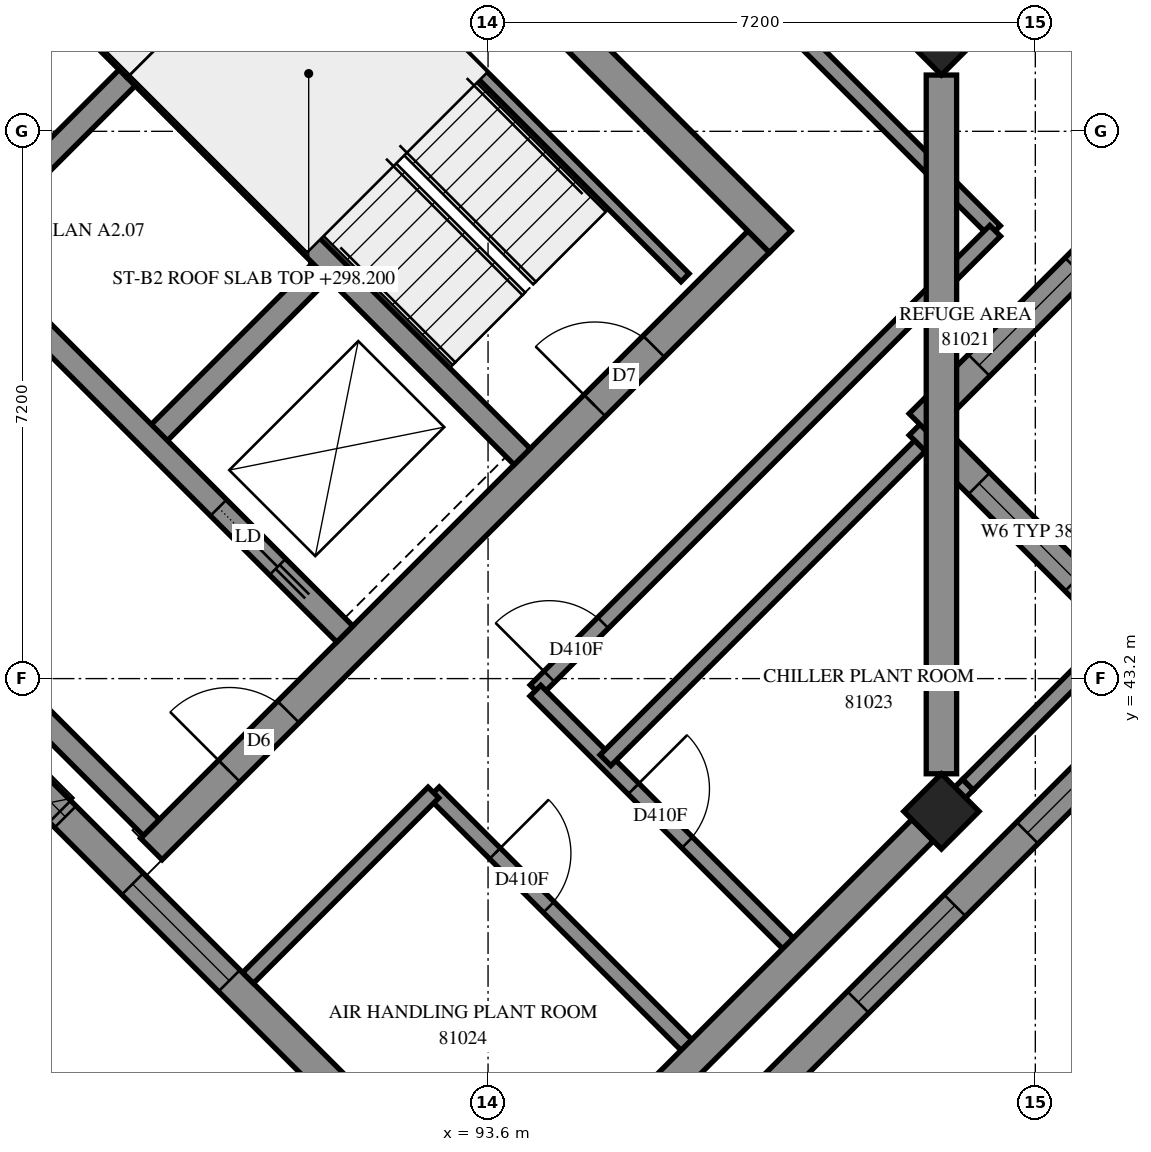
"""IFC4 building model, lengths in metres.
Left out: names, types, materials, properties, quantities, classifications, styles, units other than length and angle.
Written with IfcOpenShell. Run it as: python <this file> out.ifc"""

import sys

from ifc_helpers import new_model, si_unit, direction, frame, frame_2d, origin, origin_2d, place, context, subcontext, project, spatial, polyline, rectangle, outline, extrude, element, fill, save


model = new_model("IFC4")
c1 = context("Model", 3, precision=1e-05, world=origin(), true_north=direction((0.0, 1.0)))
c2 = subcontext(c1, "Body", "Model", "MODEL_VIEW")
j1 = project(units=[si_unit("LENGTHUNIT", "METRE"), si_unit("PLANEANGLEUNIT", "RADIAN")], contexts=[c1])
p1 = place(None, origin())
s1 = spatial("IfcSite", under=j1, at=p1, CompositionType="ELEMENT")
p2 = place(p1, origin())
s2 = spatial("IfcBuilding", under=s1, at=p2, CompositionType="ELEMENT")
p3 = place(p2, frame((0.0, 0.0, 298.2)))
s3 = spatial("IfcBuildingStorey", under=s2, at=p3, CompositionType="ELEMENT", Elevation=298.2)
for number, where, z_axis, x_axis in (
    (1, (99.565, 51.635, 0.0), (0.0, 0.0, 1.0), (0.707, -0.707, 0.0)),
    (2, (99.565, 41.453, 0.0), (0.0, 0.0, 1.0), (0.707, -0.707, 0.0)),
):
    element("IfcColumn", number, at=place(p3, frame(where, z_axis=z_axis, x_axis=x_axis)), inside=s3, PredefinedType="COLUMN", context=c2, shape_type="SweptSolid", body=[
        extrude(rectangle(XDim=0.7, YDim=0.7, at=origin_2d()), origin(), (0.0, 0.0, 1.0), 3.5),
    ])
p4 = place(p3, frame((86.695, 59.696, -0.3), z_axis=(0.0, 0.0, 1.0), x_axis=(0.7071100706, -0.7071034917, 0.0)))
e3 = element("IfcWall", 3, at=p4, inside=s3, PredefinedType="SHEAR", context=c2, shape_type="SweptSolid", body=[
    extrude(outline(polyline([(0.0, 0.0), (15.2, 0.0), (15.2, 3.1), (0.0, 3.1), (0.0, 0.0)])), frame((0.0, 0.2, 0.0), z_axis=(0.0, -1.0, 0.0), x_axis=(1.0, 0.0, 0.0)), (0.0, 0.0, 1.0), 0.4),
])
p5 = place(p4, frame((10.4, 0.0, 0.3)))
e4 = element("IfcOpeningElement", 4, at=p5, cuts=e3, PredefinedType="OPENING", context=c2, shape_type="SweptSolid", body=[
    extrude(rectangle(XDim=0.8, YDim=2.1, at=frame_2d((0.4, 1.05))), frame((0.0, 0.21, 0.0), z_axis=(0.0, -1.0, 0.0), x_axis=(1.0, 0.0, 0.0)), (0.0, 0.0, 1.0), 0.42),
])
p6 = place(p3, frame((89.17, 40.958, -0.3), z_axis=(0.0, 0.0, 1.0), x_axis=(0.7071067812, 0.7071067812, 0.0)))
e5 = element("IfcWall", 5, at=p6, inside=s3, PredefinedType="SHEAR", context=c2, shape_type="SweptSolid", body=[
    extrude(outline(polyline([(0.0, 0.0), (11.3, 0.0), (11.3, 3.1), (0.0, 3.1), (0.0, 0.0)])), frame((0.0, 0.2, 0.0), z_axis=(0.0, -1.0, 0.0), x_axis=(1.0, 0.0, 0.0)), (0.0, 0.0, 1.0), 0.4),
])
p7 = place(p6, frame((1.45, 0.0, 0.3)))
e6 = element("IfcOpeningElement", 6, at=p7, cuts=e5, PredefinedType="OPENING", context=c2, shape_type="SweptSolid", body=[
    extrude(rectangle(XDim=1.1, YDim=2.1, at=frame_2d((0.55, 1.05))), frame((0.0, 0.21, 0.0), z_axis=(0.0, -1.0, 0.0), x_axis=(1.0, 0.0, 0.0)), (0.0, 0.0, 1.0), 0.42),
])
p8 = place(p6, frame((8.25, 0.0, 0.3)))
e7 = element("IfcOpeningElement", 7, at=p8, cuts=e5, PredefinedType="OPENING", context=c2, shape_type="SweptSolid", body=[
    extrude(rectangle(XDim=1.1, YDim=2.1, at=frame_2d((0.55, 1.05))), frame((0.0, 0.21, 0.0), z_axis=(0.0, -1.0, 0.0), x_axis=(1.0, 0.0, 0.0)), (0.0, 0.0, 1.0), 0.42),
])
for number, where, z_axis, x_axis in (
    (8, (86.625, 48.878, 0.0), (0.0, 0.0, 1.0), (0.707, 0.707, 0.0)),
    (9, (89.17, 46.332, 0.0), (0.0, 0.0, 1.0), (0.707, 0.707, 0.0)),
):
    element("IfcWall", number, at=place(p3, frame(where, z_axis=z_axis, x_axis=x_axis)), inside=s3, PredefinedType="SOLIDWALL", context=c2, shape_type="SweptSolid", body=[
        extrude(outline(polyline([(0.0, 0.0), (3.3, 0.0), (3.3, 3.5), (0.0, 3.5), (0.0, 0.0)])), frame((0.0, 0.15, 0.0), z_axis=(0.0, -1.0, 0.0), x_axis=(1.0, 0.0, 0.0)), (0.0, 0.0, 1.0), 0.3),
    ])
p9 = place(p3, frame((78.988, 51.423, 0.0), z_axis=(0.0, 0.0, 1.0), x_axis=(0.7071067812, -0.7071067812, 0.0)))
e10 = element("IfcWall", 10, at=p9, inside=s3, PredefinedType="SOLIDWALL", context=c2, shape_type="SweptSolid", body=[
    extrude(outline(polyline([(0.0, 0.0), (14.4, 0.0), (14.4, 3.5), (0.0, 3.5), (0.0, 0.0)])), frame((0.0, 0.15, 0.0), z_axis=(0.0, -1.0, 0.0), x_axis=(1.0, 0.0, 0.0)), (0.0, 0.0, 1.0), 0.3),
])
p10 = place(p3, frame((81.534, 53.969, 0.0), z_axis=(0.0, 0.0, 1.0), x_axis=(0.707103309, -0.7071102534, 0.0)))
e11 = element("IfcWall", 11, at=p10, inside=s3, PredefinedType="SOLIDWALL", context=c2, shape_type="SweptSolid", body=[
    extrude(outline(polyline([(0.0, 0.0), (14.4, 0.0), (14.4, 3.5), (0.0, 3.5), (0.0, 0.0)])), frame((0.0, 0.15, 0.0), z_axis=(0.0, -1.0, 0.0), x_axis=(1.0, 0.0, 0.0)), (0.0, 0.0, 1.0), 0.3),
])
p11 = place(p10, frame((12.05, 0.0, 0.0)))
e12 = element("IfcOpeningElement", 12, at=p11, cuts=e11, PredefinedType="OPENING", context=c2, shape_type="SweptSolid", body=[
    extrude(rectangle(XDim=1.1, YDim=2.1, at=frame_2d((0.55, 1.05))), frame((0.0, 0.16, 0.0), z_axis=(0.0, -1.0, 0.0), x_axis=(1.0, 0.0, 0.0)), (0.0, 0.0, 1.0), 0.32),
])
for number, where, z_axis, x_axis in (
    (13, (83.867, 56.302, 0.0), (0.0, 0.0, 1.0), (0.707, -0.707, 0.0)),
    (14, (88.958, 51.211, 0.0), (0.0, 0.0, 1.0), (0.707, -0.707, 0.0)),
):
    element("IfcWall", number, at=place(p3, frame(where, z_axis=z_axis, x_axis=x_axis)), inside=s3, PredefinedType="SOLIDWALL", context=c2, shape_type="SweptSolid", body=[
        extrude(outline(polyline([(0.0, 0.0), (7.2, 0.0), (7.2, 3.5), (0.0, 3.5), (0.0, 0.0)])), frame((0.0, 0.15, 0.0), z_axis=(0.0, -1.0, 0.0), x_axis=(1.0, 0.0, 0.0)), (0.0, 0.0, 1.0), 0.3),
    ])
p12 = place(p3, frame((88.958, 51.211, 0.0), z_axis=(0.0, 0.0, 1.0), x_axis=(0.7071067812, 0.7071067812, 0.0)))
e15 = element("IfcWall", 15, at=p12, inside=s3, PredefinedType="SOLIDWALL", context=c2, shape_type="SweptSolid", body=[
    extrude(outline(polyline([(0.0, 0.0), (4.2, 0.0), (4.2, 3.5), (0.0, 3.5), (0.0, 0.0)])), frame((0.0, 0.15, 0.0), z_axis=(0.0, -1.0, 0.0), x_axis=(1.0, 0.0, 0.0)), (0.0, 0.0, 1.0), 0.3),
])
p13 = place(p3, frame((102.676, 43.15, 0.0), z_axis=(0.0, 0.0, 1.0), x_axis=(-0.7070963646, 0.7071171977, 0.0)))
e16 = element("IfcWall", 16, at=p13, inside=s3, PredefinedType="SOLIDWALL", context=c2, shape_type="SweptSolid", body=[
    extrude(outline(polyline([(-0.2, -0.2), (4.6, -0.2), (5.0, 0.2), (0.2, 0.2), (-0.2, -0.2)])), origin(), (0.0, 0.0, 1.0), 3.5),
])
p14 = place(p13, frame((1.9, 0.0, 0.7)))
e17 = element("IfcOpeningElement", 17, at=p14, cuts=e16, PredefinedType="OPENING", context=c2, shape_type="SweptSolid", body=[
    extrude(rectangle(XDim=1.8, YDim=2.2, at=frame_2d((0.9, 1.1))), frame((0.0, 0.21, 0.0), z_axis=(0.0, -1.0, 0.0), x_axis=(1.0, 0.0, 0.0)), (0.0, 0.0, 1.0), 0.42),
])
p15 = place(p3, frame((99.282, 46.544, 0.0), z_axis=(0.0, 0.0, 1.0), x_axis=(0.7071067812, 0.7071067812, 0.0)))
e18 = element("IfcWall", 18, at=p15, inside=s3, PredefinedType="SOLIDWALL", context=c2, shape_type="SweptSolid", body=[
    extrude(outline(polyline([(0.2, -0.2), (6.23, -0.2), (5.657, 0.2), (-0.2, 0.2), (0.2, -0.2)])), origin(), (0.0, 0.0, 1.0), 3.5),
])
p16 = place(p15, frame((1.1, 0.0, 0.7)))
e19 = element("IfcOpeningElement", 19, at=p16, cuts=e18, PredefinedType="OPENING", context=c2, shape_type="SweptSolid", body=[
    extrude(rectangle(XDim=1.8, YDim=2.2, at=frame_2d((0.9, 1.1))), frame((0.0, 0.21, 0.0), z_axis=(0.0, -1.0, 0.0), x_axis=(1.0, 0.0, 0.0)), (0.0, 0.0, 1.0), 0.42),
])
p17 = place(p3, frame((103.484, 50.747, 0.0), z_axis=(0.0, 0.0, 1.0), x_axis=(-0.9078558767, 0.4192823716, 0.0)))
e20 = element("IfcWall", 20, at=p17, inside=s3, PredefinedType="SOLIDWALL", context=c2, shape_type="SweptSolid", body=[
    extrude(outline(polyline([(-0.287, -0.2), (3.273, -0.2), (3.345, 0.2), (0.287, 0.2), (-0.287, -0.2)])), origin(), (0.0, 0.0, 1.0), 3.5),
])
p18 = place(p17, frame((0.898, 0.0, 0.7)))
e21 = element("IfcOpeningElement", 21, at=p18, cuts=e20, PredefinedType="OPENING", context=c2, shape_type="SweptSolid", body=[
    extrude(rectangle(XDim=1.8, YDim=2.2, at=frame_2d((0.9, 1.1))), frame((0.0, 0.21, 0.0), z_axis=(0.0, -1.0, 0.0), x_axis=(1.0, 0.0, 0.0)), (0.0, 0.0, 1.0), 0.42),
])
p19 = place(p3, frame((84.291, 45.13, 0.0), z_axis=(0.0, 0.0, 1.0), x_axis=(0.7071067812, -0.7071067812, 0.0)))
e22 = element("IfcWall", 22, at=p19, inside=s3, PredefinedType="SOLIDWALL", context=c2, shape_type="SweptSolid", body=[
    extrude(outline(polyline([(-0.2, -0.2), (14.6, -0.2), (14.2, 0.2), (-0.2, 0.2), (-0.2, -0.2)])), origin(), (0.0, 0.0, 1.0), 3.5),
])
p20 = place(p19, frame((0.5, 0.0, 0.7)))
e23 = element("IfcOpeningElement", 23, at=p20, cuts=e22, PredefinedType="OPENING", context=c2, shape_type="SweptSolid", body=[
    extrude(rectangle(XDim=1.8, YDim=2.2, at=frame_2d((0.9, 1.1))), frame((0.0, 0.21, 0.0), z_axis=(0.0, -1.0, 0.0), x_axis=(1.0, 0.0, 0.0)), (0.0, 0.0, 1.0), 0.42),
])
p21 = place(p19, frame((3.5, 0.0, 0.7)))
e24 = element("IfcOpeningElement", 24, at=p21, cuts=e22, PredefinedType="OPENING", context=c2, shape_type="SweptSolid", body=[
    extrude(rectangle(XDim=1.8, YDim=2.2, at=frame_2d((0.9, 1.1))), frame((0.0, 0.21, 0.0), z_axis=(0.0, -1.0, 0.0), x_axis=(1.0, 0.0, 0.0)), (0.0, 0.0, 1.0), 0.42),
])
p22 = place(p19, frame((6.55, 0.0, 0.7)))
e25 = element("IfcOpeningElement", 25, at=p22, cuts=e22, PredefinedType="OPENING", context=c2, shape_type="SweptSolid", body=[
    extrude(rectangle(XDim=1.8, YDim=2.2, at=frame_2d((0.9, 1.1))), frame((0.0, 0.21, 0.0), z_axis=(0.0, -1.0, 0.0), x_axis=(1.0, 0.0, 0.0)), (0.0, 0.0, 1.0), 0.42),
])
p23 = place(p19, frame((10.7, 0.0, 0.7)))
e26 = element("IfcOpeningElement", 26, at=p23, cuts=e22, PredefinedType="OPENING", context=c2, shape_type="SweptSolid", body=[
    extrude(rectangle(XDim=1.8, YDim=2.2, at=frame_2d((0.9, 1.1))), frame((0.0, 0.21, 0.0), z_axis=(0.0, -1.0, 0.0), x_axis=(1.0, 0.0, 0.0)), (0.0, 0.0, 1.0), 0.42),
])
p24 = place(p3, frame((94.474, 34.948, 0.0), z_axis=(0.0, 0.0, 1.0), x_axis=(0.7071110915, 0.7071024708, 0.0)))
e27 = element("IfcWall", 27, at=p24, inside=s3, PredefinedType="SOLIDWALL", context=c2, shape_type="SweptSolid", body=[
    extrude(outline(polyline([(-0.2, -0.2), (11.8, -0.2), (11.4, 0.2), (0.2, 0.2), (-0.2, -0.2)])), origin(), (0.0, 0.0, 1.0), 3.5),
])
p25 = place(p24, frame((1.75, 0.0, 0.7)))
e28 = element("IfcOpeningElement", 28, at=p25, cuts=e27, PredefinedType="OPENING", context=c2, shape_type="SweptSolid", body=[
    extrude(rectangle(XDim=1.8, YDim=2.2, at=frame_2d((0.9, 1.1))), frame((0.0, 0.21, 0.0), z_axis=(0.0, -1.0, 0.0), x_axis=(1.0, 0.0, 0.0)), (0.0, 0.0, 1.0), 0.42),
])
p26 = place(p24, frame((5.65, 0.0, 0.7)))
e29 = element("IfcOpeningElement", 29, at=p26, cuts=e27, PredefinedType="OPENING", context=c2, shape_type="SweptSolid", body=[
    extrude(rectangle(XDim=1.8, YDim=2.2, at=frame_2d((0.9, 1.1))), frame((0.0, 0.21, 0.0), z_axis=(0.0, -1.0, 0.0), x_axis=(1.0, 0.0, 0.0)), (0.0, 0.0, 1.0), 0.42),
])
p27 = place(p24, frame((8.8, 0.0, 0.7)))
e30 = element("IfcOpeningElement", 30, at=p27, cuts=e27, PredefinedType="OPENING", context=c2, shape_type="SweptSolid", body=[
    extrude(rectangle(XDim=1.8, YDim=2.2, at=frame_2d((0.9, 1.1))), frame((0.0, 0.21, 0.0), z_axis=(0.0, -1.0, 0.0), x_axis=(1.0, 0.0, 0.0)), (0.0, 0.0, 1.0), 0.42),
])
p28 = place(p3, frame((91.313, 53.354, 0.0), z_axis=(0.0, 0.0, 1.0), x_axis=(0.7071140275, -0.7070995348, 0.0)))
e31 = element("IfcWall", 31, at=p28, inside=s3, PredefinedType="PARTITIONING", context=c2, shape_type="SweptSolid", body=[
    extrude(outline(polyline([(0.0, 0.0), (6.9, 0.0), (6.9, 3.5), (0.0, 3.5), (0.0, 0.0)])), frame((0.0, 0.075, 0.0), z_axis=(0.0, -1.0, 0.0), x_axis=(1.0, 0.0, 0.0)), (0.0, 0.0, 1.0), 0.15),
])
p29 = place(p3, frame((100.269, 49.087, 0.0), z_axis=(0.0, 0.0, 1.0), x_axis=(-0.7071525817, 0.7070609777, 0.0)))
e32 = element("IfcWall", 32, at=p29, inside=s3, PredefinedType="PARTITIONING", context=c2, shape_type="SweptSolid", body=[
    extrude(rectangle(XDim=13.1, YDim=0.2, at=frame_2d((6.55, 0.0))), origin(), (0.0, 0.0, 1.0), 3.5),
])
p30 = place(p29, frame((10.029, 0.0, 0.0)))
e33 = element("IfcOpeningElement", 33, at=p30, cuts=e32, PredefinedType="OPENING", context=c2, shape_type="SweptSolid", body=[
    extrude(rectangle(XDim=1.0, YDim=2.1, at=frame_2d((0.5, 1.05))), frame((0.0, 0.11, 0.0), z_axis=(0.0, -1.0, 0.0), x_axis=(1.0, 0.0, 0.0)), (0.0, 0.0, 1.0), 0.22),
])
p31 = place(p3, frame((94.225, 43.045, 0.0), z_axis=(0.0, 0.0, 1.0), x_axis=(0.7071067812, 0.7071067812, 0.0)))
e34 = element("IfcWall", 34, at=p31, inside=s3, PredefinedType="PARTITIONING", context=c2, shape_type="SweptSolid", body=[
    extrude(rectangle(XDim=8.55, YDim=0.2, at=frame_2d((4.275, 0.0))), origin(), (0.0, 0.0, 1.0), 3.5),
])
p32 = place(p31, frame((0.256, 0.0, 0.0)))
e35 = element("IfcOpeningElement", 35, at=p32, cuts=e34, PredefinedType="OPENING", context=c2, shape_type="SweptSolid", body=[
    extrude(rectangle(XDim=1.0, YDim=2.1, at=frame_2d((0.5, 1.05))), frame((0.0, 0.11, 0.0), z_axis=(0.0, -1.0, 0.0), x_axis=(1.0, 0.0, 0.0)), (0.0, 0.0, 1.0), 0.22),
])
p33 = place(p3, frame((92.887, 41.703, 0.0), z_axis=(0.0, 0.0, 1.0), x_axis=(0.7071067812, -0.7071067812, 0.0)))
e36 = element("IfcWall", 36, at=p33, inside=s3, PredefinedType="PARTITIONING", context=c2, shape_type="SweptSolid", body=[
    extrude(rectangle(XDim=4.899, YDim=0.2, at=frame_2d((2.449, 0.0))), origin(), (0.0, 0.0, 1.0), 3.5),
])
p34 = place(p33, frame((1.136, 0.0, 0.0)))
e37 = element("IfcOpeningElement", 37, at=p34, cuts=e36, PredefinedType="OPENING", context=c2, shape_type="SweptSolid", body=[
    extrude(rectangle(XDim=1.0, YDim=2.1, at=frame_2d((0.5, 1.05))), frame((0.0, 0.11, 0.0), z_axis=(0.0, -1.0, 0.0), x_axis=(1.0, 0.0, 0.0)), (0.0, 0.0, 1.0), 0.22),
])
p35 = place(p3, frame((94.223, 43.041, 0.0), z_axis=(0.0, 0.0, 1.0), x_axis=(0.7071067812, -0.7071067812, 0.0)))
e38 = element("IfcWall", 38, at=p35, inside=s3, PredefinedType="PARTITIONING", context=c2, shape_type="SweptSolid", body=[
    extrude(rectangle(XDim=4.899, YDim=0.2, at=frame_2d((2.449, 0.0))), origin(), (0.0, 0.0, 1.0), 3.5),
])
p36 = place(p35, frame((1.825, 0.0, 0.0)))
e39 = element("IfcOpeningElement", 39, at=p36, cuts=e38, PredefinedType="OPENING", context=c2, shape_type="SweptSolid", body=[
    extrude(rectangle(XDim=1.0, YDim=2.1, at=frame_2d((0.5, 1.05))), frame((0.0, 0.11, 0.0), z_axis=(0.0, -1.0, 0.0), x_axis=(1.0, 0.0, 0.0)), (0.0, 0.0, 1.0), 0.22),
])
p37 = place(p3, frame((90.442, 39.262, 0.0), z_axis=(0.0, 0.0, 1.0), x_axis=(0.7071067812, 0.7071067812, 0.0)))
e40 = element("IfcWall", 40, at=p37, inside=s3, PredefinedType="PARTITIONING", context=c2, shape_type="SweptSolid", body=[
    extrude(rectangle(XDim=3.449, YDim=0.2, at=frame_2d((1.725, 0.0))), origin(), (0.0, 0.0, 1.0), 3.5),
])
for number, where, z_axis, x_axis in (
    (41, (94.123, 36.013, 0.0), (0.0, 0.0, 1.0), (0.707, 0.707, 0.0)),
    (42, (97.69, 39.58, 0.0), (0.0, 0.0, 1.0), (0.707, 0.707, 0.0)),
):
    element("IfcWall", number, at=place(p3, frame(where, z_axis=z_axis, x_axis=x_axis)), inside=s3, PredefinedType="PARTITIONING", context=c2, shape_type="SweptSolid", body=[
        extrude(rectangle(XDim=3.145, YDim=0.2, at=frame_2d((1.573, 0.0))), origin(), (0.0, 0.0, 1.0), 3.0),
    ])
p38 = place(p3, frame((96.346, 38.238, 0.0), z_axis=(0.0, 0.0, 1.0), x_axis=(0.7065800724, 0.7076330979, 0.0)))
e43 = element("IfcWall", 43, at=p38, inside=s3, PredefinedType="PARTITIONING", context=c2, shape_type="SweptSolid", body=[
    extrude(rectangle(XDim=1.899, YDim=0.2, at=frame_2d((0.95, 0.0))), origin(), (0.0, 0.0, 1.0), 3.0),
])
p39 = place(p3, frame((95.144, 42.126, 0.0), z_axis=(0.0, 0.0, 1.0), x_axis=(0.7071067812, 0.7071067812, 0.0)))
e44 = element("IfcWall", 44, at=p39, inside=s3, PredefinedType="PARTITIONING", context=c2, shape_type="SweptSolid", body=[
    extrude(outline(polyline([(0.0, -0.1), (5.85, -0.1), (5.85, 0.1), (0.0, 0.1), (0.0, -0.1)])), origin(), (0.0, 0.0, 1.0), 3.5),
])
p40 = place(p3, frame((99.914, 41.804, 0.0), z_axis=(0.0, 0.0, 1.0), x_axis=(0.7071067812, 0.7071067812, 0.0)))
e45 = element("IfcWall", 45, at=p40, inside=s3, PredefinedType="PARTITIONING", context=c2, shape_type="SweptSolid", body=[
    extrude(outline(polyline([(0.0, -0.1), (2.705, -0.1), (2.705, 0.1), (0.0, 0.1), (0.0, -0.1)])), origin(), (0.0, 0.0, 1.0), 3.5),
])
p41 = place(p14, origin())
e46 = element("IfcWindow", 46, at=p41, inside=s3, PartitioningType="SINGLE_PANEL", PredefinedType="WINDOW", context=c2, shape_type="SweptSolid", body=[
    extrude(rectangle(XDim=1.8, YDim=2.2, at=frame_2d((0.9, 1.1))), frame((0.0, 0.08, 0.0), z_axis=(0.0, -1.0, 0.0), x_axis=(1.0, 0.0, 0.0)), (0.0, 0.0, 1.0), 0.06),
])
fill(e17, e46)
p42 = place(p16, origin())
e47 = element("IfcWindow", 47, at=p42, inside=s3, PartitioningType="SINGLE_PANEL", PredefinedType="WINDOW", context=c2, shape_type="SweptSolid", body=[
    extrude(rectangle(XDim=1.8, YDim=2.2, at=frame_2d((0.9, 1.1))), frame((0.0, 0.08, 0.0), z_axis=(0.0, -1.0, 0.0), x_axis=(1.0, 0.0, 0.0)), (0.0, 0.0, 1.0), 0.06),
])
fill(e19, e47)
p43 = place(p18, origin())
e48 = element("IfcWindow", 48, at=p43, inside=s3, PartitioningType="SINGLE_PANEL", PredefinedType="WINDOW", context=c2, shape_type="SweptSolid", body=[
    extrude(rectangle(XDim=1.8, YDim=2.2, at=frame_2d((0.9, 1.1))), frame((0.0, 0.08, 0.0), z_axis=(0.0, -1.0, 0.0), x_axis=(1.0, 0.0, 0.0)), (0.0, 0.0, 1.0), 0.06),
])
fill(e21, e48)
p44 = place(p21, origin())
e49 = element("IfcWindow", 49, at=p44, inside=s3, PartitioningType="SINGLE_PANEL", PredefinedType="WINDOW", context=c2, shape_type="SweptSolid", body=[
    extrude(rectangle(XDim=1.8, YDim=2.2, at=frame_2d((0.9, 1.1))), frame((0.0, 0.08, 0.0), z_axis=(0.0, -1.0, 0.0), x_axis=(1.0, 0.0, 0.0)), (0.0, 0.0, 1.0), 0.06),
])
fill(e24, e49)
p45 = place(p22, origin())
e50 = element("IfcWindow", 50, at=p45, inside=s3, PartitioningType="SINGLE_PANEL", PredefinedType="WINDOW", context=c2, shape_type="SweptSolid", body=[
    extrude(rectangle(XDim=1.8, YDim=2.2, at=frame_2d((0.9, 1.1))), frame((0.0, 0.08, 0.0), z_axis=(0.0, -1.0, 0.0), x_axis=(1.0, 0.0, 0.0)), (0.0, 0.0, 1.0), 0.06),
])
fill(e25, e50)
p46 = place(p26, origin())
e51 = element("IfcWindow", 51, at=p46, inside=s3, PartitioningType="SINGLE_PANEL", PredefinedType="WINDOW", context=c2, shape_type="SweptSolid", body=[
    extrude(rectangle(XDim=1.8, YDim=2.2, at=frame_2d((0.9, 1.1))), frame((0.0, 0.08, 0.0), z_axis=(0.0, -1.0, 0.0), x_axis=(1.0, 0.0, 0.0)), (0.0, 0.0, 1.0), 0.06),
])
fill(e29, e51)
p47 = place(p27, origin())
e52 = element("IfcWindow", 52, at=p47, inside=s3, PartitioningType="SINGLE_PANEL", PredefinedType="WINDOW", context=c2, shape_type="SweptSolid", body=[
    extrude(rectangle(XDim=1.8, YDim=2.2, at=frame_2d((0.9, 1.1))), frame((0.0, 0.08, 0.0), z_axis=(0.0, -1.0, 0.0), x_axis=(1.0, 0.0, 0.0)), (0.0, 0.0, 1.0), 0.06),
])
fill(e30, e52)
p48 = place(p7, origin())
e53 = element("IfcDoor", 53, at=p48, inside=s3, OperationType="DOUBLE_DOOR_SINGLE_SWING", PredefinedType="DOOR", context=c2, shape_type="SweptSolid", body=[
    extrude(rectangle(XDim=1.1, YDim=2.1, at=frame_2d((0.55, 1.05))), frame((0.0, 0.025, 0.0), z_axis=(0.0, -1.0, 0.0), x_axis=(1.0, 0.0, 0.0)), (0.0, 0.0, 1.0), 0.05),
])
fill(e6, e53)
p49 = place(p8, origin())
e54 = element("IfcDoor", 54, at=p49, inside=s3, OperationType="SINGLE_SWING_RIGHT", PredefinedType="DOOR", context=c2, shape_type="SweptSolid", body=[
    extrude(rectangle(XDim=1.1, YDim=2.1, at=frame_2d((0.55, 1.05))), frame((0.0, 0.025, 0.0), z_axis=(0.0, -1.0, 0.0), x_axis=(1.0, 0.0, 0.0)), (0.0, 0.0, 1.0), 0.05),
])
fill(e7, e54)
p50 = place(p11, origin())
e55 = element("IfcDoor", 55, at=p50, inside=s3, OperationType="SLIDING_TO_RIGHT", PredefinedType="DOOR", context=c2, shape_type="SweptSolid", body=[
    extrude(rectangle(XDim=1.1, YDim=2.1, at=frame_2d((0.55, 1.05))), frame((0.0, 0.025, 0.0), z_axis=(0.0, -1.0, 0.0), x_axis=(1.0, 0.0, 0.0)), (0.0, 0.0, 1.0), 0.05),
])
fill(e12, e55)
p51 = place(p32, origin())
e56 = element("IfcDoor", 56, at=p51, inside=s3, OperationType="SINGLE_SWING_RIGHT", PredefinedType="DOOR", context=c2, shape_type="SweptSolid", body=[
    extrude(rectangle(XDim=1.0, YDim=2.1, at=frame_2d((0.5, 1.05))), frame((0.0, 0.025, 0.0), z_axis=(0.0, -1.0, 0.0), x_axis=(1.0, 0.0, 0.0)), (0.0, 0.0, 1.0), 0.05),
])
fill(e35, e56)
p52 = place(p36, origin())
e57 = element("IfcDoor", 57, at=p52, inside=s3, OperationType="SINGLE_SWING_RIGHT", PredefinedType="DOOR", context=c2, shape_type="SweptSolid", body=[
    extrude(rectangle(XDim=1.0, YDim=2.1, at=frame_2d((0.5, 1.05))), frame((0.0, 0.025, 0.0), z_axis=(0.0, -1.0, 0.0), x_axis=(1.0, 0.0, 0.0)), (0.0, 0.0, 1.0), 0.05),
])
fill(e39, e57)
p53 = place(p34, origin())
e58 = element("IfcDoor", 58, at=p53, inside=s3, OperationType="SINGLE_SWING_LEFT", PredefinedType="DOOR", context=c2, shape_type="SweptSolid", body=[
    extrude(rectangle(XDim=1.0, YDim=2.1, at=frame_2d((0.5, 1.05))), frame((0.0, 0.025, 0.0), z_axis=(0.0, -1.0, 0.0), x_axis=(1.0, 0.0, 0.0)), (0.0, 0.0, 1.0), 0.05),
])
fill(e37, e58)
save(model, sys.argv[1])
